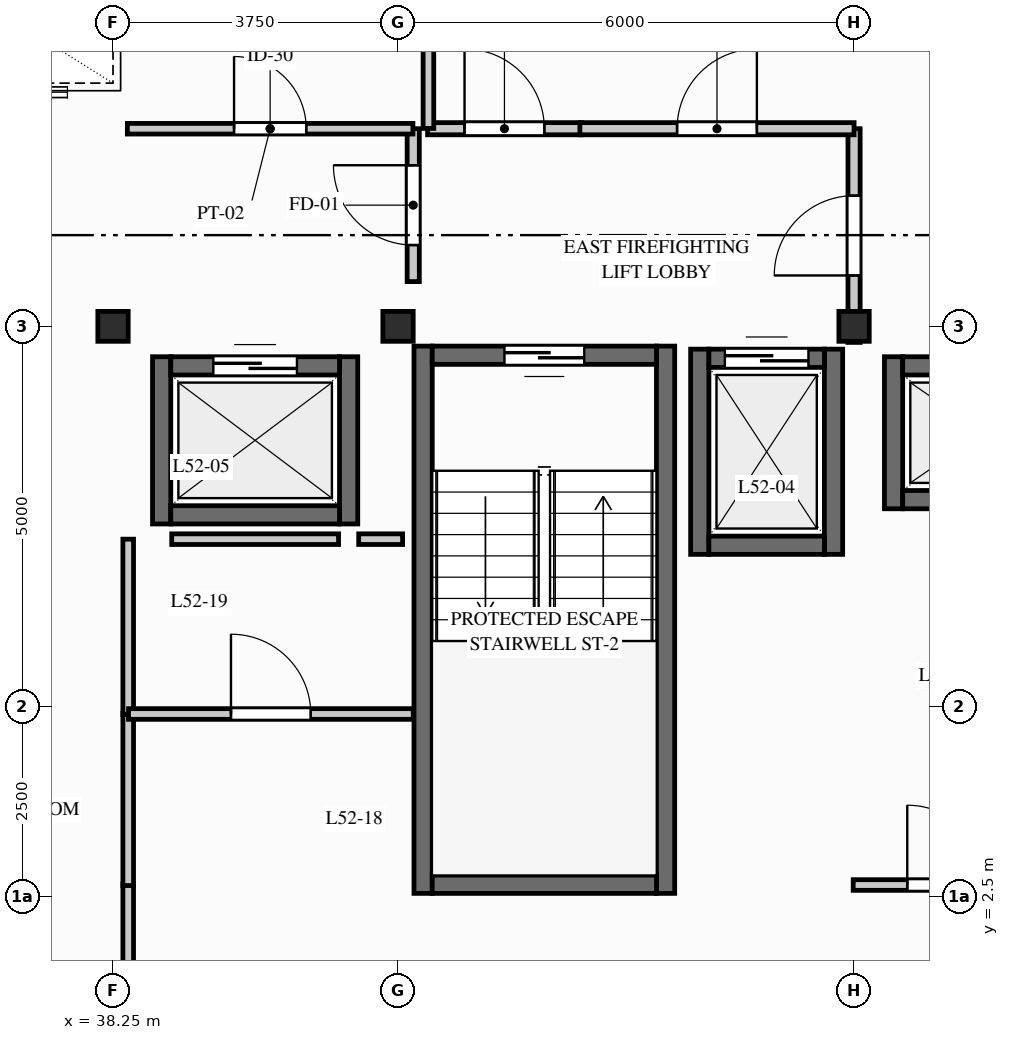
"""IFC4 building model, lengths in metres.
Left out: names, types, materials, properties, quantities, classifications, styles, units other than length and angle.
Written with IfcOpenShell. Run it as: python <this file> out.ifc"""

import sys

from ifc_helpers import new_model, si_unit, direction, frame, frame_2d, origin, origin_2d, place, context, subcontext, project, spatial, rectangle, i_section, extrude, element, fill, save


model = new_model("IFC4")
c1 = context("Model", 3, precision=1e-05, world=origin(), true_north=direction((0.0, 1.0)))
c2 = subcontext(c1, "Body", "Model", "MODEL_VIEW")
j1 = project(units=[si_unit("LENGTHUNIT", "METRE"), si_unit("PLANEANGLEUNIT", "RADIAN")], contexts=[c1])
p1 = place(None, origin())
s1 = spatial("IfcSite", under=j1, at=p1, CompositionType="ELEMENT")
p2 = place(p1, origin())
s2 = spatial("IfcBuilding", under=s1, at=p2, CompositionType="ELEMENT")
p3 = place(p2, frame((0.0, 0.0, 172.8)))
s3 = spatial("IfcBuildingStorey", under=s2, at=p3, CompositionType="ELEMENT", Elevation=172.8)
for number, where, z_axis, x_axis in (
    (1, (38.25, 10.0, 0.0), (0.0, 0.0, 1.0), (1.0, 0.0, 0.0)),
    (2, (42.0, 10.0, 0.0), (0.0, 0.0, 1.0), (1.0, 0.0, 0.0)),
    (3, (48.0, 10.0, 0.0), (0.0, 0.0, 1.0), (1.0, 0.0, 0.0)),
):
    element("IfcColumn", number, at=place(p3, frame(where, z_axis=z_axis, x_axis=x_axis)), inside=s3, PredefinedType="COLUMN", context=c2, shape_type="SweptSolid", body=[
        extrude(i_section(OverallWidth=0.399, OverallDepth=0.394, WebThickness=0.023, FlangeThickness=0.037, FilletRadius=0.015, at=origin_2d()), origin(), (0.0, 0.0, 1.0), 3.1),
    ])
for number, where, z_axis, x_axis in (
    (4, (42.33, 2.54, 0.0), (0.0, 0.0, 1.0), (0.0, 1.0, 0.0)),
    (5, (45.52, 2.54, 0.0), (0.0, 0.0, 1.0), (0.0, 1.0, 0.0)),
):
    element("IfcWall", number, at=place(p3, frame(where, z_axis=z_axis, x_axis=x_axis)), inside=s3, PredefinedType="SHEAR", context=c2, shape_type="SweptSolid", body=[
        extrude(rectangle(XDim=7.2, YDim=0.24, at=frame_2d((3.6, 0.0))), origin(), (0.0, 0.0, 1.0), 2.89),
    ])
p4 = place(p3, frame((42.45, 2.66, 0.0), z_axis=(0.0, 0.0, 1.0), x_axis=(1.0, 0.0, 0.0)))
e6 = element("IfcWall", 6, at=p4, inside=s3, PredefinedType="SHEAR", context=c2, shape_type="SweptSolid", body=[
    extrude(rectangle(XDim=2.95, YDim=0.24, at=frame_2d((1.475, 0.0))), origin(), (0.0, 0.0, 1.0), 2.89),
])
p5 = place(p3, frame((45.4, 9.62, 0.0), z_axis=(0.0, 0.0, 1.0), x_axis=(-1.0, 0.0, 0.0)))
e7 = element("IfcWall", 7, at=p5, inside=s3, PredefinedType="SHEAR", context=c2, shape_type="SweptSolid", body=[
    extrude(rectangle(XDim=2.95, YDim=0.24, at=frame_2d((1.475, 0.0))), origin(), (0.0, 0.0, 1.0), 2.89),
])
p6 = place(p5, frame((0.95, 0.0, 0.0)))
e8 = element("IfcOpeningElement", 8, at=p6, cuts=e7, PredefinedType="OPENING", context=c2, shape_type="SweptSolid", body=[
    extrude(rectangle(XDim=1.05, YDim=2.06, at=frame_2d((0.525, 1.03))), frame((0.0, 0.13, 0.0), z_axis=(0.0, -1.0, 0.0), x_axis=(1.0, 0.0, 0.0)), (0.0, 0.0, 1.0), 0.26),
])
for number, where, z_axis, x_axis in (
    (9, (45.97, 7.0, 0.0), (0.0, 0.0, 1.0), (0.0, 1.0, 0.0)),
    (10, (47.73, 7.0, 0.0), (0.0, 0.0, 1.0), (0.0, 1.0, 0.0)),
):
    element("IfcWall", number, at=place(p3, frame(where, z_axis=z_axis, x_axis=x_axis)), inside=s3, PredefinedType="SHEAR", context=c2, shape_type="SweptSolid", body=[
        extrude(rectangle(XDim=2.7, YDim=0.24, at=frame_2d((1.35, 0.0))), origin(), (0.0, 0.0, 1.0), 2.89),
    ])
p7 = place(p3, frame((46.09, 7.12, 0.0), z_axis=(0.0, 0.0, 1.0), x_axis=(1.0, 0.0, 0.0)))
e11 = element("IfcWall", 11, at=p7, inside=s3, PredefinedType="SHEAR", context=c2, shape_type="SweptSolid", body=[
    extrude(rectangle(XDim=1.52, YDim=0.24, at=frame_2d((0.76, 0.0))), origin(), (0.0, 0.0, 1.0), 2.89),
])
p8 = place(p3, frame((46.09, 9.58, 0.0), z_axis=(0.0, 0.0, 1.0), x_axis=(1.0, 0.0, 0.0)))
e12 = element("IfcWall", 12, at=p8, inside=s3, PredefinedType="SHEAR", context=c2, shape_type="SweptSolid", body=[
    extrude(rectangle(XDim=1.52, YDim=0.24, at=frame_2d((0.76, 0.0))), origin(), (0.0, 0.0, 1.0), 2.89),
])
p9 = place(p8, frame((0.21, 0.0, 0.0)))
e13 = element("IfcOpeningElement", 13, at=p9, cuts=e12, PredefinedType="OPENING", context=c2, shape_type="SweptSolid", body=[
    extrude(rectangle(XDim=1.1, YDim=2.06, at=frame_2d((0.55, 1.03))), frame((0.0, 0.13, 0.0), z_axis=(0.0, -1.0, 0.0), x_axis=(1.0, 0.0, 0.0)), (0.0, 0.0, 1.0), 0.26),
])
for number, where, z_axis, x_axis in (
    (14, (38.89, 7.4, 0.0), (0.0, 0.0, 1.0), (0.0, 1.0, 0.0)),
    (15, (41.35, 7.4, 0.0), (0.0, 0.0, 1.0), (0.0, 1.0, 0.0)),
):
    element("IfcWall", number, at=place(p3, frame(where, z_axis=z_axis, x_axis=x_axis)), inside=s3, PredefinedType="SHEAR", context=c2, shape_type="SweptSolid", body=[
        extrude(rectangle(XDim=2.2, YDim=0.24, at=frame_2d((1.1, 0.0))), origin(), (0.0, 0.0, 1.0), 2.89),
    ])
p10 = place(p3, frame((39.01, 7.52, 0.0), z_axis=(0.0, 0.0, 1.0), x_axis=(1.0, 0.0, 0.0)))
e16 = element("IfcWall", 16, at=p10, inside=s3, PredefinedType="SHEAR", context=c2, shape_type="SweptSolid", body=[
    extrude(rectangle(XDim=2.22, YDim=0.24, at=frame_2d((1.11, 0.0))), origin(), (0.0, 0.0, 1.0), 2.89),
])
p11 = place(p3, frame((39.01, 9.48, 0.0), z_axis=(0.0, 0.0, 1.0), x_axis=(1.0, 0.0, 0.0)))
e17 = element("IfcWall", 17, at=p11, inside=s3, PredefinedType="SHEAR", context=c2, shape_type="SweptSolid", body=[
    extrude(rectangle(XDim=2.22, YDim=0.24, at=frame_2d((1.11, 0.0))), origin(), (0.0, 0.0, 1.0), 2.89),
])
p12 = place(p11, frame((0.56, 0.0, 0.0)))
e18 = element("IfcOpeningElement", 18, at=p12, cuts=e17, PredefinedType="OPENING", context=c2, shape_type="SweptSolid", body=[
    extrude(rectangle(XDim=1.1, YDim=2.06, at=frame_2d((0.55, 1.03))), frame((0.0, 0.13, 0.0), z_axis=(0.0, -1.0, 0.0), x_axis=(1.0, 0.0, 0.0)), (0.0, 0.0, 1.0), 0.26),
])
p13 = place(p3, frame((48.52, 7.6, 0.0), z_axis=(0.0, 0.0, 1.0), x_axis=(0.0, 1.0, 0.0)))
e19 = element("IfcWall", 19, at=p13, inside=s3, PredefinedType="SHEAR", context=c2, shape_type="SweptSolid", body=[
    extrude(rectangle(XDim=2.0, YDim=0.24, at=frame_2d((1.0, 0.0))), origin(), (0.0, 0.0, 1.0), 2.89),
])
p14 = place(p3, frame((48.64, 7.72, 0.0), z_axis=(0.0, 0.0, 1.0), x_axis=(1.0, 0.0, 0.0)))
e20 = element("IfcWall", 20, at=p14, inside=s3, PredefinedType="SHEAR", context=c2, shape_type="SweptSolid", body=[
    extrude(rectangle(XDim=2.12, YDim=0.24, at=frame_2d((1.06, 0.0))), origin(), (0.0, 0.0, 1.0), 2.89),
])
p15 = place(p3, frame((48.64, 9.48, 0.0), z_axis=(0.0, 0.0, 1.0), x_axis=(1.0, 0.0, 0.0)))
e21 = element("IfcWall", 21, at=p15, inside=s3, PredefinedType="SHEAR", context=c2, shape_type="SweptSolid", body=[
    extrude(rectangle(XDim=2.12, YDim=0.24, at=frame_2d((1.06, 0.0))), origin(), (0.0, 0.0, 1.0), 2.89),
])
p16 = place(p15, frame((0.51, 0.0, 0.0)))
e22 = element("IfcOpeningElement", 22, at=p16, cuts=e21, PredefinedType="OPENING", context=c2, shape_type="SweptSolid", body=[
    extrude(rectangle(XDim=1.1, YDim=2.06, at=frame_2d((0.55, 1.03))), frame((0.0, 0.13, 0.0), z_axis=(0.0, -1.0, 0.0), x_axis=(1.0, 0.0, 0.0)), (0.0, 0.0, 1.0), 0.26),
])
p17 = place(p3, frame((38.45, 0.18, 0.0), z_axis=(0.0, 0.0, 1.0), x_axis=(0.0, 1.0, 0.0)))
e23 = element("IfcWall", 23, at=p17, inside=s3, PredefinedType="PARTITIONING", context=c2, shape_type="SweptSolid", body=[
    extrude(rectangle(XDim=2.481, YDim=0.14, at=frame_2d((1.241, 0.0))), origin(), (0.0, 0.0, 1.0), 2.253),
])
p18 = place(p3, frame((38.45, 2.643, 0.0), z_axis=(0.0, 0.0, 1.0), x_axis=(0.0, 1.0, 0.0)))
e24 = element("IfcWall", 24, at=p18, inside=s3, PredefinedType="PARTITIONING", context=c2, shape_type="SweptSolid", body=[
    extrude(rectangle(XDim=2.269, YDim=0.14, at=frame_2d((1.134, 0.0))), origin(), (0.0, 0.0, 1.0), 2.253),
])
p19 = place(p3, frame((38.45, 4.893, 0.0), z_axis=(0.0, 0.0, 1.0), x_axis=(0.0, 1.0, 0.0)))
e25 = element("IfcWall", 25, at=p19, inside=s3, PredefinedType="PARTITIONING", context=c2, shape_type="SweptSolid", body=[
    extrude(rectangle(XDim=2.307, YDim=0.14, at=frame_2d((1.154, 0.0))), origin(), (0.0, 0.0, 1.0), 2.253),
])
p20 = place(p3, frame((47.989, 2.65, 0.0), z_axis=(0.0, 0.0, 1.0), x_axis=(1.0, 0.0, 0.0)))
e26 = element("IfcWall", 26, at=p20, inside=s3, PredefinedType="PARTITIONING", context=c2, shape_type="SweptSolid", body=[
    extrude(rectangle(XDim=2.472, YDim=0.14, at=frame_2d((1.236, 0.0))), origin(), (0.0, 0.0, 1.0), 2.253),
])
p21 = place(p20, frame((0.711, 0.0, 0.0)))
e27 = element("IfcOpeningElement", 27, at=p21, cuts=e26, PredefinedType="OPENING", context=c2, shape_type="SweptSolid", body=[
    extrude(rectangle(XDim=1.05, YDim=2.06, at=frame_2d((0.525, 1.03))), frame((0.0, 0.08, 0.0), z_axis=(0.0, -1.0, 0.0), x_axis=(1.0, 0.0, 0.0)), (0.0, 0.0, 1.0), 0.16),
])
p22 = place(p3, frame((38.454, 4.9, 0.0), z_axis=(0.0, 0.0, 1.0), x_axis=(1.0, 0.0, 0.0)))
e28 = element("IfcWall", 28, at=p22, inside=s3, PredefinedType="PARTITIONING", context=c2, shape_type="SweptSolid", body=[
    extrude(rectangle(XDim=3.746, YDim=0.14, at=frame_2d((1.873, 0.0))), origin(), (0.0, 0.0, 1.0), 2.253),
])
p23 = place(p22, frame((1.348, 0.0, 0.0)))
e29 = element("IfcOpeningElement", 29, at=p23, cuts=e28, PredefinedType="OPENING", context=c2, shape_type="SweptSolid", body=[
    extrude(rectangle(XDim=1.05, YDim=2.06, at=frame_2d((0.525, 1.03))), frame((0.0, 0.08, 0.0), z_axis=(0.0, -1.0, 0.0), x_axis=(1.0, 0.0, 0.0)), (0.0, 0.0, 1.0), 0.16),
])
p24 = place(p3, frame((48.0, 9.789, 0.0), z_axis=(0.0, 0.0, 1.0), x_axis=(0.0, 1.0, 0.0)))
e30 = element("IfcWall", 30, at=p24, inside=s3, PredefinedType="PARTITIONING", context=c2, shape_type="SweptSolid", body=[
    extrude(rectangle(XDim=2.811, YDim=0.16, at=frame_2d((1.406, 0.0))), origin(), (0.0, 0.0, 1.0), 2.253),
])
p25 = place(p24, frame((0.881, 0.0, 0.0)))
e31 = element("IfcOpeningElement", 31, at=p25, cuts=e30, PredefinedType="OPENING", context=c2, shape_type="SweptSolid", body=[
    extrude(rectangle(XDim=1.05, YDim=2.06, at=frame_2d((0.525, 1.03))), frame((0.0, 0.09, 0.0), z_axis=(0.0, -1.0, 0.0), x_axis=(1.0, 0.0, 0.0)), (0.0, 0.0, 1.0), 0.18),
])
p26 = place(p3, frame((42.2, 10.589, 0.0), z_axis=(0.0, 0.0, 1.0), x_axis=(0.0, 1.0, 0.0)))
e32 = element("IfcWall", 32, at=p26, inside=s3, PredefinedType="PARTITIONING", context=c2, shape_type="SweptSolid", body=[
    extrude(rectangle(XDim=2.011, YDim=0.16, at=frame_2d((1.006, 0.0))), origin(), (0.0, 0.0, 1.0), 2.253),
])
p27 = place(p26, frame((0.481, 0.0, 0.0)))
e33 = element("IfcOpeningElement", 33, at=p27, cuts=e32, PredefinedType="OPENING", context=c2, shape_type="SweptSolid", body=[
    extrude(rectangle(XDim=1.05, YDim=2.06, at=frame_2d((0.525, 1.03))), frame((0.0, 0.09, 0.0), z_axis=(0.0, -1.0, 0.0), x_axis=(1.0, 0.0, 0.0)), (0.0, 0.0, 1.0), 0.18),
])
p28 = place(p3, frame((42.389, 12.6, 0.0), z_axis=(0.0, 0.0, 1.0), x_axis=(1.0, 0.0, 0.0)))
e34 = element("IfcWall", 34, at=p28, inside=s3, PredefinedType="PARTITIONING", context=c2, shape_type="SweptSolid", body=[
    extrude(rectangle(XDim=2.023, YDim=0.16, at=frame_2d((1.011, 0.0))), origin(), (0.0, 0.0, 1.0), 2.89),
])
p29 = place(p28, frame((0.486, 0.0, 0.0)))
e35 = element("IfcOpeningElement", 35, at=p29, cuts=e34, PredefinedType="OPENING", context=c2, shape_type="SweptSolid", body=[
    extrude(rectangle(XDim=1.05, YDim=2.06, at=frame_2d((0.525, 1.03))), frame((0.0, 0.09, 0.0), z_axis=(0.0, -1.0, 0.0), x_axis=(1.0, 0.0, 0.0)), (0.0, 0.0, 1.0), 0.18),
])
p30 = place(p3, frame((44.393, 12.6, 0.0), z_axis=(0.0, 0.0, 1.0), x_axis=(1.0, 0.0, 0.0)))
e36 = element("IfcWall", 36, at=p30, inside=s3, PredefinedType="PARTITIONING", context=c2, shape_type="SweptSolid", body=[
    extrude(rectangle(XDim=3.607, YDim=0.16, at=frame_2d((1.804, 0.0))), origin(), (0.0, 0.0, 1.0), 2.253),
])
p31 = place(p30, frame((1.279, 0.0, 0.0)))
e37 = element("IfcOpeningElement", 37, at=p31, cuts=e36, PredefinedType="OPENING", context=c2, shape_type="SweptSolid", body=[
    extrude(rectangle(XDim=1.05, YDim=2.06, at=frame_2d((0.525, 1.03))), frame((0.0, 0.09, 0.0), z_axis=(0.0, -1.0, 0.0), x_axis=(1.0, 0.0, 0.0)), (0.0, 0.0, 1.0), 0.18),
])
p32 = place(p3, frame((38.439, 12.6, 0.0), z_axis=(0.0, 0.0, 1.0), x_axis=(1.0, 0.0, 0.0)))
e38 = element("IfcWall", 38, at=p32, inside=s3, PredefinedType="PARTITIONING", context=c2, shape_type="SweptSolid", body=[
    extrude(rectangle(XDim=3.757, YDim=0.14, at=frame_2d((1.879, 0.0))), origin(), (0.0, 0.0, 1.0), 2.253),
])
p33 = place(p32, frame((1.404, 0.0, 0.0)))
e39 = element("IfcOpeningElement", 39, at=p33, cuts=e38, PredefinedType="OPENING", context=c2, shape_type="SweptSolid", body=[
    extrude(rectangle(XDim=0.95, YDim=2.05, at=frame_2d((0.475, 1.025))), frame((0.0, 0.08, 0.0), z_axis=(0.0, -1.0, 0.0), x_axis=(1.0, 0.0, 0.0)), (0.0, 0.0, 1.0), 0.16),
])
p34 = place(p3, frame((42.4, 12.604, 0.0), z_axis=(0.0, 0.0, 1.0), x_axis=(0.0, 1.0, 0.0)))
e40 = element("IfcWall", 40, at=p34, inside=s3, PredefinedType="PARTITIONING", context=c2, shape_type="SweptSolid", body=[
    extrude(rectangle(XDim=10.896, YDim=0.14, at=frame_2d((5.448, 0.0))), origin(), (0.0, 0.0, 1.0), 2.253),
])
p35 = place(p3, frame((41.483, 7.2, 0.0), z_axis=(0.0, 0.0, 1.0), x_axis=(1.0, 0.0, 0.0)))
e41 = element("IfcWall", 41, at=p35, inside=s3, PredefinedType="PARTITIONING", context=c2, shape_type="SweptSolid", body=[
    extrude(rectangle(XDim=0.577, YDim=0.14, at=frame_2d((0.289, 0.0))), origin(), (0.0, 0.0, 1.0), 2.253),
])
p36 = place(p3, frame((39.023, 7.2, 0.0), z_axis=(0.0, 0.0, 1.0), x_axis=(1.0, 0.0, 0.0)))
e42 = element("IfcWall", 42, at=p36, inside=s3, PredefinedType="PARTITIONING", context=c2, shape_type="SweptSolid", body=[
    extrude(rectangle(XDim=2.195, YDim=0.14, at=frame_2d((1.097, 0.0))), origin(), (0.0, 0.0, 1.0), 2.89),
])
p37 = place(p6, origin())
e43 = element("IfcDoor", 43, at=p37, inside=s3, OperationType="SINGLE_SWING_LEFT", PredefinedType="DOOR", context=c2, shape_type="SweptSolid", body=[
    extrude(rectangle(XDim=1.05, YDim=2.06, at=frame_2d((0.525, 1.03))), frame((0.0, 0.025, 0.0), z_axis=(0.0, -1.0, 0.0), x_axis=(1.0, 0.0, 0.0)), (0.0, 0.0, 1.0), 0.05),
])
fill(e8, e43)
p38 = place(p9, origin())
e44 = element("IfcDoor", 44, at=p38, inside=s3, OperationType="SLIDING_TO_LEFT", PredefinedType="DOOR", context=c2, shape_type="SweptSolid", body=[
    extrude(rectangle(XDim=1.1, YDim=2.06, at=frame_2d((0.55, 1.03))), frame((0.0, 0.025, 0.0), z_axis=(0.0, -1.0, 0.0), x_axis=(1.0, 0.0, 0.0)), (0.0, 0.0, 1.0), 0.05),
])
fill(e13, e44)
p39 = place(p12, origin())
e45 = element("IfcDoor", 45, at=p39, inside=s3, OperationType="SLIDING_TO_RIGHT", PredefinedType="DOOR", context=c2, shape_type="SweptSolid", body=[
    extrude(rectangle(XDim=1.1, YDim=2.06, at=frame_2d((0.55, 1.03))), frame((0.0, 0.025, 0.0), z_axis=(0.0, -1.0, 0.0), x_axis=(1.0, 0.0, 0.0)), (0.0, 0.0, 1.0), 0.05),
])
fill(e18, e45)
p40 = place(p21, origin())
e46 = element("IfcDoor", 46, at=p40, inside=s3, OperationType="SINGLE_SWING_LEFT", PredefinedType="DOOR", context=c2, shape_type="SweptSolid", body=[
    extrude(rectangle(XDim=1.05, YDim=2.06, at=frame_2d((0.525, 1.03))), frame((0.0, 0.025, 0.0), z_axis=(0.0, -1.0, 0.0), x_axis=(1.0, 0.0, 0.0)), (0.0, 0.0, 1.0), 0.05),
])
fill(e27, e46)
p41 = place(p23, origin())
e47 = element("IfcDoor", 47, at=p41, inside=s3, OperationType="SINGLE_SWING_LEFT", PredefinedType="DOOR", context=c2, shape_type="SweptSolid", body=[
    extrude(rectangle(XDim=1.05, YDim=2.06, at=frame_2d((0.525, 1.03))), frame((0.0, 0.025, 0.0), z_axis=(0.0, -1.0, 0.0), x_axis=(1.0, 0.0, 0.0)), (0.0, 0.0, 1.0), 0.05),
])
fill(e29, e47)
p42 = place(p25, origin())
e48 = element("IfcDoor", 48, at=p42, inside=s3, OperationType="SINGLE_SWING_LEFT", PredefinedType="DOOR", context=c2, shape_type="SweptSolid", body=[
    extrude(rectangle(XDim=1.05, YDim=2.06, at=frame_2d((0.525, 1.03))), frame((0.0, 0.025, 0.0), z_axis=(0.0, -1.0, 0.0), x_axis=(1.0, 0.0, 0.0)), (0.0, 0.0, 1.0), 0.05),
])
fill(e31, e48)
p43 = place(p27, origin())
e49 = element("IfcDoor", 49, at=p43, inside=s3, OperationType="SINGLE_SWING_RIGHT", PredefinedType="DOOR", context=c2, shape_type="SweptSolid", body=[
    extrude(rectangle(XDim=1.05, YDim=2.06, at=frame_2d((0.525, 1.03))), frame((0.0, 0.025, 0.0), z_axis=(0.0, -1.0, 0.0), x_axis=(1.0, 0.0, 0.0)), (0.0, 0.0, 1.0), 0.05),
])
fill(e33, e49)
p44 = place(p29, origin())
e50 = element("IfcDoor", 50, at=p44, inside=s3, OperationType="SINGLE_SWING_LEFT", PredefinedType="DOOR", context=c2, shape_type="SweptSolid", body=[
    extrude(rectangle(XDim=1.05, YDim=2.06, at=frame_2d((0.525, 1.03))), frame((0.0, 0.025, 0.0), z_axis=(0.0, -1.0, 0.0), x_axis=(1.0, 0.0, 0.0)), (0.0, 0.0, 1.0), 0.05),
])
fill(e35, e50)
p45 = place(p31, origin())
e51 = element("IfcDoor", 51, at=p45, inside=s3, OperationType="SINGLE_SWING_RIGHT", PredefinedType="DOOR", context=c2, shape_type="SweptSolid", body=[
    extrude(rectangle(XDim=1.05, YDim=2.06, at=frame_2d((0.525, 1.03))), frame((0.0, 0.025, 0.0), z_axis=(0.0, -1.0, 0.0), x_axis=(1.0, 0.0, 0.0)), (0.0, 0.0, 1.0), 0.05),
])
fill(e37, e51)
p46 = place(p33, origin())
e52 = element("IfcDoor", 52, at=p46, inside=s3, OperationType="SINGLE_SWING_LEFT", PredefinedType="DOOR", context=c2, shape_type="SweptSolid", body=[
    extrude(rectangle(XDim=0.95, YDim=2.05, at=frame_2d((0.475, 1.025))), frame((0.0, 0.025, 0.0), z_axis=(0.0, -1.0, 0.0), x_axis=(1.0, 0.0, 0.0)), (0.0, 0.0, 1.0), 0.05),
])
fill(e39, e52)
save(model, sys.argv[1])
